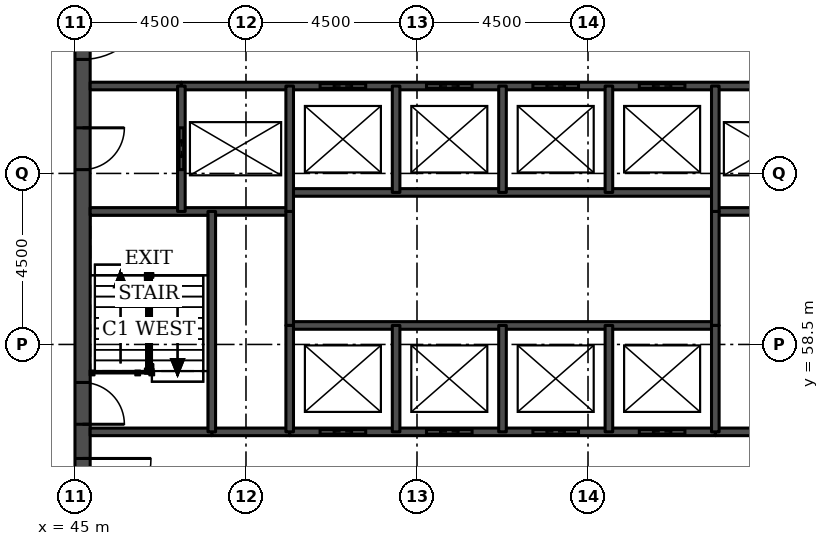
"""IFC4 building model, lengths in metres.
Left out: names, types, materials, properties, quantities, classifications, styles, units other than length and angle.
Written with IfcOpenShell. Run it as: python <this file> out.ifc"""

import sys

from ifc_helpers import new_model, si_unit, direction, frame, frame_2d, origin, place, context, subcontext, project, spatial, rectangle, extrude, element, fill, save


model = new_model("IFC4")
c1 = context("Model", 3, precision=1e-05, world=origin(), true_north=direction((0.0, 1.0)))
c2 = subcontext(c1, "Body", "Model", "MODEL_VIEW")
j1 = project(units=[si_unit("LENGTHUNIT", "METRE"), si_unit("PLANEANGLEUNIT", "RADIAN")], contexts=[c1])
p1 = place(None, origin())
s1 = spatial("IfcSite", under=j1, at=p1, CompositionType="ELEMENT")
p2 = place(p1, origin())
s2 = spatial("IfcBuilding", under=s1, at=p2, CompositionType="ELEMENT")
p3 = place(p2, frame((0.0, 0.0, 143.1)))
s3 = spatial("IfcBuildingStorey", under=s2, at=p3, CompositionType="ELEMENT", Elevation=143.1)
p4 = place(p3, frame((45.2, 49.5, 0.0), z_axis=(0.0, 0.0, 1.0), x_axis=(0.0, 1.0, 0.0)))
e1 = element("IfcWall", 1, at=p4, inside=s3, PredefinedType="SHEAR", context=c2, shape_type="SweptSolid", body=[
    extrude(rectangle(XDim=22.5, YDim=0.4, at=frame_2d((11.25, 0.0))), origin(), (0.0, 0.0, 1.0), 4.6),
])
p5 = place(p4, frame((4.2, 0.0, 0.0)))
e2 = element("IfcOpeningElement", 2, at=p5, cuts=e1, PredefinedType="OPENING", context=c2, shape_type="SweptSolid", body=[
    extrude(rectangle(XDim=1.8, YDim=2.1, at=frame_2d((0.9, 1.05))), frame((0.0, 0.21, 0.0), z_axis=(0.0, -1.0, 0.0), x_axis=(1.0, 0.0, 0.0)), (0.0, 0.0, 1.0), 0.42),
])
p6 = place(p4, frame((6.9, 0.0, 0.0)))
e3 = element("IfcOpeningElement", 3, at=p6, cuts=e1, PredefinedType="OPENING", context=c2, shape_type="SweptSolid", body=[
    extrude(rectangle(XDim=1.1, YDim=2.1, at=frame_2d((0.55, 1.05))), frame((0.0, 0.21, 0.0), z_axis=(0.0, -1.0, 0.0), x_axis=(1.0, 0.0, 0.0)), (0.0, 0.0, 1.0), 0.42),
])
p7 = place(p4, frame((13.6, 0.0, 0.0)))
e4 = element("IfcOpeningElement", 4, at=p7, cuts=e1, PredefinedType="OPENING", context=c2, shape_type="SweptSolid", body=[
    extrude(rectangle(XDim=1.1, YDim=2.1, at=frame_2d((0.55, 1.05))), frame((0.0, 0.21, 0.0), z_axis=(0.0, -1.0, 0.0), x_axis=(1.0, 0.0, 0.0)), (0.0, 0.0, 1.0), 0.42),
])
p8 = place(p4, frame((16.5, 0.0, 0.0)))
e5 = element("IfcOpeningElement", 5, at=p8, cuts=e1, PredefinedType="OPENING", context=c2, shape_type="SweptSolid", body=[
    extrude(rectangle(XDim=1.8, YDim=2.1, at=frame_2d((0.9, 1.05))), frame((0.0, 0.21, 0.0), z_axis=(0.0, -1.0, 0.0), x_axis=(1.0, 0.0, 0.0)), (0.0, 0.0, 1.0), 0.42),
])
for number, where, z_axis, x_axis in (
    (6, (48.6, 56.2, 0.0), (0.0, 0.0, 1.0), (1.0, 0.0, 0.0)),
    (7, (61.85, 56.2, 0.0), (0.0, 0.0, 1.0), (1.0, 0.0, 0.0)),
):
    element("IfcWall", number, at=place(p3, frame(where, z_axis=z_axis, x_axis=x_axis)), inside=s3, PredefinedType="SOLIDWALL", context=c2, shape_type="SweptSolid", body=[
        extrude(rectangle(XDim=2.05, YDim=0.2, at=frame_2d((1.025, 0.0))), origin(), (0.0, 0.0, 1.0), 4.45),
    ])
p9 = place(p3, frame((45.4, 56.2, 0.0), z_axis=(0.0, 0.0, 1.0), x_axis=(1.0, 0.0, 0.0)))
e8 = element("IfcWall", 8, at=p9, inside=s3, PredefinedType="SOLIDWALL", context=c2, shape_type="SweptSolid", body=[
    extrude(rectangle(XDim=3.2, YDim=0.2, at=frame_2d((1.6, 0.0))), origin(), (0.0, 0.0, 1.0), 4.45),
])
p10 = place(p3, frame((50.65, 56.2, 0.0), z_axis=(0.0, 0.0, 1.0), x_axis=(1.0, 0.0, 0.0)))
e9 = element("IfcWall", 9, at=p10, inside=s3, PredefinedType="SOLIDWALL", context=c2, shape_type="SweptSolid", body=[
    extrude(rectangle(XDim=11.2, YDim=0.2, at=frame_2d((5.6, 0.0))), origin(), (0.0, 0.0, 1.0), 4.45),
])
p11 = place(p10, frame((0.8, 0.0, 0.0)))
e10 = element("IfcOpeningElement", 10, at=p11, cuts=e9, PredefinedType="OPENING", context=c2, shape_type="SweptSolid", body=[
    extrude(rectangle(XDim=1.2, YDim=2.1, at=frame_2d((0.6, 1.05))), frame((0.0, 0.11, 0.0), z_axis=(0.0, -1.0, 0.0), x_axis=(1.0, 0.0, 0.0)), (0.0, 0.0, 1.0), 0.22),
])
p12 = place(p10, frame((3.6, 0.0, 0.0)))
e11 = element("IfcOpeningElement", 11, at=p12, cuts=e9, PredefinedType="OPENING", context=c2, shape_type="SweptSolid", body=[
    extrude(rectangle(XDim=1.2, YDim=2.1, at=frame_2d((0.6, 1.05))), frame((0.0, 0.11, 0.0), z_axis=(0.0, -1.0, 0.0), x_axis=(1.0, 0.0, 0.0)), (0.0, 0.0, 1.0), 0.22),
])
p13 = place(p10, frame((6.4, 0.0, 0.0)))
e12 = element("IfcOpeningElement", 12, at=p13, cuts=e9, PredefinedType="OPENING", context=c2, shape_type="SweptSolid", body=[
    extrude(rectangle(XDim=1.2, YDim=2.1, at=frame_2d((0.6, 1.05))), frame((0.0, 0.11, 0.0), z_axis=(0.0, -1.0, 0.0), x_axis=(1.0, 0.0, 0.0)), (0.0, 0.0, 1.0), 0.22),
])
p14 = place(p10, frame((9.2, 0.0, 0.0)))
e13 = element("IfcOpeningElement", 13, at=p14, cuts=e9, PredefinedType="OPENING", context=c2, shape_type="SweptSolid", body=[
    extrude(rectangle(XDim=1.2, YDim=2.1, at=frame_2d((0.6, 1.05))), frame((0.0, 0.11, 0.0), z_axis=(0.0, -1.0, 0.0), x_axis=(1.0, 0.0, 0.0)), (0.0, 0.0, 1.0), 0.22),
])
p15 = place(p3, frame((50.65, 59.0, 0.0), z_axis=(0.0, 0.0, 1.0), x_axis=(1.0, 0.0, 0.0)))
e14 = element("IfcWall", 14, at=p15, inside=s3, PredefinedType="SOLIDWALL", context=c2, shape_type="SweptSolid", body=[
    extrude(rectangle(XDim=11.2, YDim=0.2, at=frame_2d((5.6, 0.0))), origin(), (0.0, 0.0, 1.0), 4.6),
])
for number, where, z_axis, x_axis in (
    (15, (45.4, 62.0, 0.0), (0.0, 0.0, 1.0), (1.0, 0.0, 0.0)),
    (16, (61.85, 62.0, 0.0), (0.0, 0.0, 1.0), (1.0, 0.0, 0.0)),
):
    element("IfcWall", number, at=place(p3, frame(where, z_axis=z_axis, x_axis=x_axis)), inside=s3, PredefinedType="SOLIDWALL", context=c2, shape_type="SweptSolid", body=[
        extrude(rectangle(XDim=5.25, YDim=0.2, at=frame_2d((2.625, 0.0))), origin(), (0.0, 0.0, 1.0), 4.45),
    ])
p16 = place(p3, frame((50.65, 62.5, 0.0), z_axis=(0.0, 0.0, 1.0), x_axis=(1.0, 0.0, 0.0)))
e17 = element("IfcWall", 17, at=p16, inside=s3, PredefinedType="SOLIDWALL", context=c2, shape_type="SweptSolid", body=[
    extrude(rectangle(XDim=11.2, YDim=0.2, at=frame_2d((5.6, 0.0))), origin(), (0.0, 0.0, 1.0), 4.6),
])
p17 = place(p3, frame((45.4, 65.3, 0.0), z_axis=(0.0, 0.0, 1.0), x_axis=(1.0, 0.0, 0.0)))
e18 = element("IfcWall", 18, at=p17, inside=s3, PredefinedType="SOLIDWALL", context=c2, shape_type="SweptSolid", body=[
    extrude(rectangle(XDim=2.4, YDim=0.2, at=frame_2d((1.2, 0.0))), origin(), (0.0, 0.0, 1.0), 4.45),
])
p18 = place(p3, frame((47.8, 65.3, 0.0), z_axis=(0.0, 0.0, 1.0), x_axis=(1.0, 0.0, 0.0)))
e19 = element("IfcWall", 19, at=p18, inside=s3, PredefinedType="SOLIDWALL", context=c2, shape_type="SweptSolid", body=[
    extrude(rectangle(XDim=16.9, YDim=0.2, at=frame_2d((8.45, 0.0))), origin(), (0.0, 0.0, 1.0), 4.45),
])
p19 = place(p18, frame((3.65, 0.0, 0.0)))
e20 = element("IfcOpeningElement", 20, at=p19, cuts=e19, PredefinedType="OPENING", context=c2, shape_type="SweptSolid", body=[
    extrude(rectangle(XDim=1.2, YDim=2.1, at=frame_2d((0.6, 1.05))), frame((0.0, 0.11, 0.0), z_axis=(0.0, -1.0, 0.0), x_axis=(1.0, 0.0, 0.0)), (0.0, 0.0, 1.0), 0.22),
])
p20 = place(p18, frame((6.45, 0.0, 0.0)))
e21 = element("IfcOpeningElement", 21, at=p20, cuts=e19, PredefinedType="OPENING", context=c2, shape_type="SweptSolid", body=[
    extrude(rectangle(XDim=1.2, YDim=2.1, at=frame_2d((0.6, 1.05))), frame((0.0, 0.11, 0.0), z_axis=(0.0, -1.0, 0.0), x_axis=(1.0, 0.0, 0.0)), (0.0, 0.0, 1.0), 0.22),
])
p21 = place(p18, frame((9.25, 0.0, 0.0)))
e22 = element("IfcOpeningElement", 22, at=p21, cuts=e19, PredefinedType="OPENING", context=c2, shape_type="SweptSolid", body=[
    extrude(rectangle(XDim=1.2, YDim=2.1, at=frame_2d((0.6, 1.05))), frame((0.0, 0.11, 0.0), z_axis=(0.0, -1.0, 0.0), x_axis=(1.0, 0.0, 0.0)), (0.0, 0.0, 1.0), 0.22),
])
p22 = place(p18, frame((12.05, 0.0, 0.0)))
e23 = element("IfcOpeningElement", 23, at=p22, cuts=e19, PredefinedType="OPENING", context=c2, shape_type="SweptSolid", body=[
    extrude(rectangle(XDim=1.2, YDim=2.1, at=frame_2d((0.6, 1.05))), frame((0.0, 0.11, 0.0), z_axis=(0.0, -1.0, 0.0), x_axis=(1.0, 0.0, 0.0)), (0.0, 0.0, 1.0), 0.22),
])
p23 = place(p3, frame((47.8, 62.0, 0.0), z_axis=(0.0, 0.0, 1.0), x_axis=(0.0, 1.0, 0.0)))
e24 = element("IfcWall", 24, at=p23, inside=s3, PredefinedType="SOLIDWALL", context=c2, shape_type="SweptSolid", body=[
    extrude(rectangle(XDim=3.3, YDim=0.2, at=frame_2d((1.65, 0.0))), origin(), (0.0, 0.0, 1.0), 4.45),
])
p24 = place(p23, frame((1.1, 0.0, 0.0)))
e25 = element("IfcOpeningElement", 25, at=p24, cuts=e24, PredefinedType="OPENING", context=c2, shape_type="SweptSolid", body=[
    extrude(rectangle(XDim=1.1, YDim=2.1, at=frame_2d((0.55, 1.05))), frame((0.0, 0.11, 0.0), z_axis=(0.0, -1.0, 0.0), x_axis=(1.0, 0.0, 0.0)), (0.0, 0.0, 1.0), 0.22),
])
p25 = place(p3, frame((48.6, 56.2, 0.0), z_axis=(0.0, 0.0, 1.0), x_axis=(0.0, 1.0, 0.0)))
e26 = element("IfcWall", 26, at=p25, inside=s3, PredefinedType="SOLIDWALL", context=c2, shape_type="SweptSolid", body=[
    extrude(rectangle(XDim=5.8, YDim=0.2, at=frame_2d((2.9, 0.0))), origin(), (0.0, 0.0, 1.0), 4.45),
])
p26 = place(p3, frame((50.65, 59.0, 0.0), z_axis=(0.0, 0.0, 1.0), x_axis=(0.0, 1.0, 0.0)))
e27 = element("IfcWall", 27, at=p26, inside=s3, PredefinedType="SOLIDWALL", context=c2, shape_type="SweptSolid", body=[
    extrude(rectangle(XDim=3.0, YDim=0.2, at=frame_2d((1.5, 0.0))), origin(), (0.0, 0.0, 1.0), 4.6),
])
p27 = place(p3, frame((50.65, 56.2, 0.0), z_axis=(0.0, 0.0, 1.0), x_axis=(0.0, 1.0, 0.0)))
e28 = element("IfcWall", 28, at=p27, inside=s3, PredefinedType="SOLIDWALL", context=c2, shape_type="SweptSolid", body=[
    extrude(rectangle(XDim=2.8, YDim=0.2, at=frame_2d((1.4, 0.0))), origin(), (0.0, 0.0, 1.0), 4.45),
])
p28 = place(p3, frame((50.65, 62.0, 0.0), z_axis=(0.0, 0.0, 1.0), x_axis=(0.0, 1.0, 0.0)))
e29 = element("IfcWall", 29, at=p28, inside=s3, PredefinedType="SOLIDWALL", context=c2, shape_type="SweptSolid", body=[
    extrude(rectangle(XDim=3.3, YDim=0.2, at=frame_2d((1.65, 0.0))), origin(), (0.0, 0.0, 1.0), 4.45),
])
for number, where, z_axis, x_axis in (
    (30, (53.45, 56.2, 0.0), (0.0, 0.0, 1.0), (0.0, 1.0, 0.0)),
    (31, (53.45, 62.5, 0.0), (0.0, 0.0, 1.0), (0.0, 1.0, 0.0)),
    (32, (56.25, 56.2, 0.0), (0.0, 0.0, 1.0), (0.0, 1.0, 0.0)),
    (33, (56.25, 62.5, 0.0), (0.0, 0.0, 1.0), (0.0, 1.0, 0.0)),
    (34, (59.05, 56.2, 0.0), (0.0, 0.0, 1.0), (0.0, 1.0, 0.0)),
    (35, (59.05, 62.5, 0.0), (0.0, 0.0, 1.0), (0.0, 1.0, 0.0)),
):
    element("IfcWall", number, at=place(p3, frame(where, z_axis=z_axis, x_axis=x_axis)), inside=s3, PredefinedType="SOLIDWALL", context=c2, shape_type="SweptSolid", body=[
        extrude(rectangle(XDim=2.8, YDim=0.2, at=frame_2d((1.4, 0.0))), origin(), (0.0, 0.0, 1.0), 4.45),
    ])
p29 = place(p3, frame((61.85, 59.0, 0.0), z_axis=(0.0, 0.0, 1.0), x_axis=(0.0, 1.0, 0.0)))
e36 = element("IfcWall", 36, at=p29, inside=s3, PredefinedType="SOLIDWALL", context=c2, shape_type="SweptSolid", body=[
    extrude(rectangle(XDim=3.0, YDim=0.2, at=frame_2d((1.5, 0.0))), origin(), (0.0, 0.0, 1.0), 4.6),
])
p30 = place(p3, frame((61.85, 56.2, 0.0), z_axis=(0.0, 0.0, 1.0), x_axis=(0.0, 1.0, 0.0)))
e37 = element("IfcWall", 37, at=p30, inside=s3, PredefinedType="SOLIDWALL", context=c2, shape_type="SweptSolid", body=[
    extrude(rectangle(XDim=2.8, YDim=0.2, at=frame_2d((1.4, 0.0))), origin(), (0.0, 0.0, 1.0), 4.45),
])
p31 = place(p3, frame((61.85, 62.0, 0.0), z_axis=(0.0, 0.0, 1.0), x_axis=(0.0, 1.0, 0.0)))
e38 = element("IfcWall", 38, at=p31, inside=s3, PredefinedType="SOLIDWALL", context=c2, shape_type="SweptSolid", body=[
    extrude(rectangle(XDim=3.3, YDim=0.2, at=frame_2d((1.65, 0.0))), origin(), (0.0, 0.0, 1.0), 4.45),
])
p32 = place(p11, origin())
e39 = element("IfcDoor", 39, at=p32, inside=s3, OperationType="DOUBLE_DOOR_SLIDING", PredefinedType="DOOR", context=c2, shape_type="SweptSolid", body=[
    extrude(rectangle(XDim=1.2, YDim=2.1, at=frame_2d((0.6, 1.05))), frame((0.0, 0.025, 0.0), z_axis=(0.0, -1.0, 0.0), x_axis=(1.0, 0.0, 0.0)), (0.0, 0.0, 1.0), 0.05),
])
fill(e10, e39)
p33 = place(p12, origin())
e40 = element("IfcDoor", 40, at=p33, inside=s3, OperationType="DOUBLE_DOOR_SLIDING", PredefinedType="DOOR", context=c2, shape_type="SweptSolid", body=[
    extrude(rectangle(XDim=1.2, YDim=2.1, at=frame_2d((0.6, 1.05))), frame((0.0, 0.025, 0.0), z_axis=(0.0, -1.0, 0.0), x_axis=(1.0, 0.0, 0.0)), (0.0, 0.0, 1.0), 0.05),
])
fill(e11, e40)
p34 = place(p13, origin())
e41 = element("IfcDoor", 41, at=p34, inside=s3, OperationType="DOUBLE_DOOR_SLIDING", PredefinedType="DOOR", context=c2, shape_type="SweptSolid", body=[
    extrude(rectangle(XDim=1.2, YDim=2.1, at=frame_2d((0.6, 1.05))), frame((0.0, 0.025, 0.0), z_axis=(0.0, -1.0, 0.0), x_axis=(1.0, 0.0, 0.0)), (0.0, 0.0, 1.0), 0.05),
])
fill(e12, e41)
p35 = place(p14, origin())
e42 = element("IfcDoor", 42, at=p35, inside=s3, OperationType="DOUBLE_DOOR_SLIDING", PredefinedType="DOOR", context=c2, shape_type="SweptSolid", body=[
    extrude(rectangle(XDim=1.2, YDim=2.1, at=frame_2d((0.6, 1.05))), frame((0.0, 0.025, 0.0), z_axis=(0.0, -1.0, 0.0), x_axis=(1.0, 0.0, 0.0)), (0.0, 0.0, 1.0), 0.05),
])
fill(e13, e42)
p36 = place(p19, origin())
e43 = element("IfcDoor", 43, at=p36, inside=s3, OperationType="DOUBLE_DOOR_SLIDING", PredefinedType="DOOR", context=c2, shape_type="SweptSolid", body=[
    extrude(rectangle(XDim=1.2, YDim=2.1, at=frame_2d((0.6, 1.05))), frame((0.0, 0.025, 0.0), z_axis=(0.0, -1.0, 0.0), x_axis=(1.0, 0.0, 0.0)), (0.0, 0.0, 1.0), 0.05),
])
fill(e20, e43)
p37 = place(p20, origin())
e44 = element("IfcDoor", 44, at=p37, inside=s3, OperationType="DOUBLE_DOOR_SLIDING", PredefinedType="DOOR", context=c2, shape_type="SweptSolid", body=[
    extrude(rectangle(XDim=1.2, YDim=2.1, at=frame_2d((0.6, 1.05))), frame((0.0, 0.025, 0.0), z_axis=(0.0, -1.0, 0.0), x_axis=(1.0, 0.0, 0.0)), (0.0, 0.0, 1.0), 0.05),
])
fill(e21, e44)
p38 = place(p21, origin())
e45 = element("IfcDoor", 45, at=p38, inside=s3, OperationType="DOUBLE_DOOR_SLIDING", PredefinedType="DOOR", context=c2, shape_type="SweptSolid", body=[
    extrude(rectangle(XDim=1.2, YDim=2.1, at=frame_2d((0.6, 1.05))), frame((0.0, 0.025, 0.0), z_axis=(0.0, -1.0, 0.0), x_axis=(1.0, 0.0, 0.0)), (0.0, 0.0, 1.0), 0.05),
])
fill(e22, e45)
p39 = place(p22, origin())
e46 = element("IfcDoor", 46, at=p39, inside=s3, OperationType="DOUBLE_DOOR_SLIDING", PredefinedType="DOOR", context=c2, shape_type="SweptSolid", body=[
    extrude(rectangle(XDim=1.2, YDim=2.1, at=frame_2d((0.6, 1.05))), frame((0.0, 0.025, 0.0), z_axis=(0.0, -1.0, 0.0), x_axis=(1.0, 0.0, 0.0)), (0.0, 0.0, 1.0), 0.05),
])
fill(e23, e46)
p40 = place(p24, origin())
e47 = element("IfcDoor", 47, at=p40, inside=s3, OperationType="DOUBLE_DOOR_SLIDING", PredefinedType="DOOR", context=c2, shape_type="SweptSolid", body=[
    extrude(rectangle(XDim=1.1, YDim=2.1, at=frame_2d((0.55, 1.05))), frame((0.0, 0.025, 0.0), z_axis=(0.0, -1.0, 0.0), x_axis=(1.0, 0.0, 0.0)), (0.0, 0.0, 1.0), 0.05),
])
fill(e25, e47)
p41 = place(p5, frame((1.8, 0.0, 0.0), z_axis=(0.0, 0.0, 1.0), x_axis=(-1.0, 0.0, 0.0)))
e48 = element("IfcDoor", 48, at=p41, inside=s3, OperationType="SINGLE_SWING_LEFT", PredefinedType="DOOR", context=c2, shape_type="SweptSolid", body=[
    extrude(rectangle(XDim=1.8, YDim=2.1, at=frame_2d((0.9, 1.05))), frame((0.0, 0.025, 0.0), z_axis=(0.0, -1.0, 0.0), x_axis=(1.0, 0.0, 0.0)), (0.0, 0.0, 1.0), 0.05),
])
fill(e2, e48)
p42 = place(p6, frame((1.1, 0.0, 0.0), z_axis=(0.0, 0.0, 1.0), x_axis=(-1.0, 0.0, 0.0)))
e49 = element("IfcDoor", 49, at=p42, inside=s3, OperationType="SINGLE_SWING_RIGHT", PredefinedType="DOOR", context=c2, shape_type="SweptSolid", body=[
    extrude(rectangle(XDim=1.1, YDim=2.1, at=frame_2d((0.55, 1.05))), frame((0.0, 0.025, 0.0), z_axis=(0.0, -1.0, 0.0), x_axis=(1.0, 0.0, 0.0)), (0.0, 0.0, 1.0), 0.05),
])
fill(e3, e49)
p43 = place(p7, frame((1.1, 0.0, 0.0), z_axis=(0.0, 0.0, 1.0), x_axis=(-1.0, 0.0, 0.0)))
e50 = element("IfcDoor", 50, at=p43, inside=s3, OperationType="SINGLE_SWING_LEFT", PredefinedType="DOOR", context=c2, shape_type="SweptSolid", body=[
    extrude(rectangle(XDim=1.1, YDim=2.1, at=frame_2d((0.55, 1.05))), frame((0.0, 0.025, 0.0), z_axis=(0.0, -1.0, 0.0), x_axis=(1.0, 0.0, 0.0)), (0.0, 0.0, 1.0), 0.05),
])
fill(e4, e50)
p44 = place(p8, frame((1.8, 0.0, 0.0), z_axis=(0.0, 0.0, 1.0), x_axis=(-1.0, 0.0, 0.0)))
e51 = element("IfcDoor", 51, at=p44, inside=s3, OperationType="SINGLE_SWING_LEFT", PredefinedType="DOOR", context=c2, shape_type="SweptSolid", body=[
    extrude(rectangle(XDim=1.8, YDim=2.1, at=frame_2d((0.9, 1.05))), frame((0.0, 0.025, 0.0), z_axis=(0.0, -1.0, 0.0), x_axis=(1.0, 0.0, 0.0)), (0.0, 0.0, 1.0), 0.05),
])
fill(e5, e51)
save(model, sys.argv[1])
